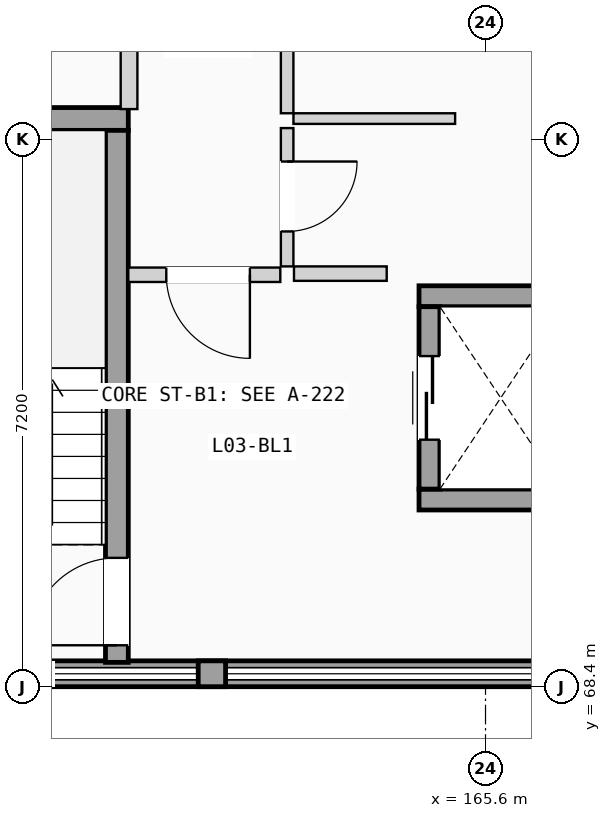
"""IFC4 building model, lengths in metres.
Left out: names, types, materials, properties, quantities, classifications, styles, units other than length and angle.
Written with IfcOpenShell. Run it as: python <this file> out.ifc"""

import sys

from ifc_helpers import new_model, si_unit, direction, frame, frame_2d, origin, place, context, subcontext, project, spatial, rectangle, extrude, element, fill, save


model = new_model("IFC4")
c1 = context("Model", 3, precision=1e-05, world=origin(), true_north=direction((0.0, 1.0)))
c2 = subcontext(c1, "Body", "Model", "MODEL_VIEW")
j1 = project(units=[si_unit("LENGTHUNIT", "METRE"), si_unit("PLANEANGLEUNIT", "RADIAN")], contexts=[c1])
p1 = place(None, origin())
s1 = spatial("IfcSite", under=j1, at=p1, CompositionType="ELEMENT")
p2 = place(p1, origin())
s2 = spatial("IfcBuilding", under=s1, at=p2, CompositionType="ELEMENT")
p3 = place(p2, frame((0.0, 0.0, 12.075)))
s3 = spatial("IfcBuildingStorey", under=s2, at=p3, CompositionType="ELEMENT", Elevation=12.075)
p4 = place(p3, frame((151.2, 68.57, 0.0), z_axis=(0.0, 0.0, 1.0), x_axis=(1.0, 0.0, 0.0)))
e1 = element("IfcWall", 1, at=p4, inside=s3, PredefinedType="SOLIDWALL", context=c2, shape_type="SweptSolid", body=[
    extrude(rectangle(XDim=21.6, YDim=0.34, at=frame_2d((10.8, 0.0))), origin(), (0.0, 0.0, 1.0), 1.11),
])
p5 = place(p3, frame((161.82, 68.57, 1.11), z_axis=(0.0, 0.0, 1.0), x_axis=(1.0, 0.0, 0.0)))
e2 = element("IfcWall", 2, at=p5, inside=s3, PredefinedType="SOLIDWALL", context=c2, shape_type="SweptSolid", body=[
    extrude(rectangle(XDim=0.36, YDim=0.34, at=frame_2d((0.18, 0.0))), origin(), (0.0, 0.0, 1.0), 1.78),
])
p6 = place(p3, frame((156.95, 75.87, 0.0), z_axis=(0.0, 0.0, 1.0), x_axis=(1.0, 0.0, 0.0)))
e3 = element("IfcWall", 3, at=p6, inside=s3, PredefinedType="SHEAR", context=c2, shape_type="SweptSolid", body=[
    extrude(rectangle(XDim=3.95, YDim=0.3, at=frame_2d((1.975, 0.0))), origin(), (0.0, 0.0, 1.0), 2.89),
])
p7 = place(p3, frame((160.75, 68.72, 0.0), z_axis=(0.0, 0.0, 1.0), x_axis=(0.0, 1.0, 0.0)))
e4 = element("IfcWall", 4, at=p7, inside=s3, PredefinedType="SHEAR", context=c2, shape_type="SweptSolid", body=[
    extrude(rectangle(XDim=7.0, YDim=0.3, at=frame_2d((3.5, 0.0))), origin(), (0.0, 0.0, 1.0), 2.89),
])
p8 = place(p7, frame((0.225, 0.0, 0.0)))
e5 = element("IfcOpeningElement", 5, at=p8, cuts=e4, PredefinedType="OPENING", context=c2, shape_type="SweptSolid", body=[
    extrude(rectangle(XDim=1.15, YDim=2.12, at=frame_2d((0.575, 1.06))), frame((0.0, 0.16, 0.0), z_axis=(0.0, -1.0, 0.0), x_axis=(1.0, 0.0, 0.0)), (0.0, 0.0, 1.0), 0.32),
])
for number, where, z_axis, x_axis in (
    (6, (164.725, 70.863, 0.0), (0.0, 0.0, 1.0), (1.0, 0.0, 0.0)),
    (7, (164.725, 73.538, 0.0), (0.0, 0.0, 1.0), (1.0, 0.0, 0.0)),
):
    element("IfcWall", number, at=place(p3, frame(where, z_axis=z_axis, x_axis=x_axis)), inside=s3, PredefinedType="SHEAR", context=c2, shape_type="SweptSolid", body=[
        extrude(rectangle(XDim=2.15, YDim=0.275, at=frame_2d((1.075, 0.0))), origin(), (0.0, 0.0, 1.0), 2.89),
    ])
p9 = place(p3, frame((164.863, 71.0, 0.0), z_axis=(0.0, 0.0, 1.0), x_axis=(0.0, 1.0, 0.0)))
e8 = element("IfcWall", 8, at=p9, inside=s3, PredefinedType="SHEAR", context=c2, shape_type="SweptSolid", body=[
    extrude(rectangle(XDim=2.4, YDim=0.275, at=frame_2d((1.2, 0.0))), origin(), (0.0, 0.0, 1.0), 2.89),
])
p10 = place(p9, frame((0.65, 0.0, 0.0)))
e9 = element("IfcOpeningElement", 9, at=p10, cuts=e8, PredefinedType="OPENING", context=c2, shape_type="SweptSolid", body=[
    extrude(rectangle(XDim=1.1, YDim=2.15, at=frame_2d((0.55, 1.075))), frame((0.0, 0.147, 0.0), z_axis=(0.0, -1.0, 0.0), x_axis=(1.0, 0.0, 0.0)), (0.0, 0.0, 1.0), 0.295),
])
p11 = place(p3, frame((163.08, 73.835, 0.0), z_axis=(0.0, 0.0, 1.0), x_axis=(1.0, 0.0, 0.0)))
e10 = element("IfcWall", 10, at=p11, inside=s3, PredefinedType="PARTITIONING", context=c2, shape_type="SweptSolid", body=[
    extrude(rectangle(XDim=1.22, YDim=0.19, at=frame_2d((0.61, 0.0))), origin(), (0.0, 0.0, 1.0), 2.87),
])
p12 = place(p3, frame((160.9, 73.82, 0.0), z_axis=(0.0, 0.0, 1.0), x_axis=(1.0, 0.0, 0.0)))
e11 = element("IfcWall", 11, at=p12, inside=s3, PredefinedType="PARTITIONING", context=c2, shape_type="SweptSolid", body=[
    extrude(rectangle(XDim=2.0, YDim=0.19, at=frame_2d((1.0, 0.0))), origin(), (0.0, 0.0, 1.0), 2.87),
])
p13 = place(p12, frame((0.5, 0.0, 0.0)))
e12 = element("IfcOpeningElement", 12, at=p13, cuts=e11, PredefinedType="OPENING", context=c2, shape_type="SweptSolid", body=[
    extrude(rectangle(XDim=1.1, YDim=2.12, at=frame_2d((0.55, 1.06))), frame((0.0, 0.105, 0.0), z_axis=(0.0, -1.0, 0.0), x_axis=(1.0, 0.0, 0.0)), (0.0, 0.0, 1.0), 0.21),
])
p14 = place(p3, frame((162.99, 73.93, 0.0), z_axis=(0.0, 0.0, 1.0), x_axis=(0.0, 1.0, 0.0)))
e13 = element("IfcWall", 13, at=p14, inside=s3, PredefinedType="PARTITIONING", context=c2, shape_type="SweptSolid", body=[
    extrude(rectangle(XDim=1.82, YDim=0.165, at=frame_2d((0.91, 0.0))), origin(), (0.0, 0.0, 1.0), 2.87),
])
p15 = place(p14, frame((0.46, 0.0, 0.0)))
e14 = element("IfcOpeningElement", 14, at=p15, cuts=e13, PredefinedType="OPENING", context=c2, shape_type="SweptSolid", body=[
    extrude(rectangle(XDim=0.92, YDim=2.04, at=frame_2d((0.46, 1.02))), frame((0.0, 0.093, 0.0), z_axis=(0.0, -1.0, 0.0), x_axis=(1.0, 0.0, 0.0)), (0.0, 0.0, 1.0), 0.185),
])
p16 = place(p3, frame((163.073, 75.875, 0.0), z_axis=(0.0, 0.0, 1.0), x_axis=(1.0, 0.0, 0.0)))
e15 = element("IfcWall", 15, at=p16, inside=s3, PredefinedType="PARTITIONING", context=c2, shape_type="SweptSolid", body=[
    extrude(rectangle(XDim=2.127, YDim=0.14, at=frame_2d((1.063, 0.0))), origin(), (0.0, 0.0, 1.0), 2.87),
])
p17 = place(p3, frame((160.91, 76.0, 0.0), z_axis=(0.0, 0.0, 1.0), x_axis=(0.0, 1.0, 0.0)))
e16 = element("IfcWall", 16, at=p17, inside=s3, PredefinedType="PLUMBINGWALL", context=c2, shape_type="SweptSolid", body=[
    extrude(rectangle(XDim=3.493, YDim=0.22, at=frame_2d((1.747, 0.0))), origin(), (0.0, 0.0, 1.0), 2.87),
])
p18 = place(p3, frame((162.99, 75.945, 0.0), z_axis=(0.0, 0.0, 1.0), x_axis=(0.0, 1.0, 0.0)))
e17 = element("IfcWall", 17, at=p18, inside=s3, PredefinedType="PARTITIONING", context=c2, shape_type="SweptSolid", body=[
    extrude(rectangle(XDim=5.728, YDim=0.165, at=frame_2d((2.864, 0.0))), origin(), (0.0, 0.0, 1.0), 2.87),
])
p19 = place(p18, frame((2.402, 0.0, 0.0)))
e18 = element("IfcOpeningElement", 18, at=p19, cuts=e17, PredefinedType="OPENING", context=c2, shape_type="SweptSolid", body=[
    extrude(rectangle(XDim=0.98, YDim=2.08, at=frame_2d((0.49, 1.04))), frame((0.0, 0.093, 0.0), z_axis=(0.0, -1.0, 0.0), x_axis=(1.0, 0.0, 0.0)), (0.0, 0.0, 1.0), 0.185),
])
p20 = place(p8, origin())
e19 = element("IfcDoor", 19, at=p20, inside=s3, OperationType="SINGLE_SWING_LEFT", PredefinedType="DOOR", context=c2, shape_type="SweptSolid", body=[
    extrude(rectangle(XDim=1.15, YDim=2.12, at=frame_2d((0.575, 1.06))), frame((0.0, 0.025, 0.0), z_axis=(0.0, -1.0, 0.0), x_axis=(1.0, 0.0, 0.0)), (0.0, 0.0, 1.0), 0.05),
])
fill(e5, e19)
p21 = place(p10, origin())
e20 = element("IfcDoor", 20, at=p21, inside=s3, OperationType="SLIDING_TO_LEFT", PredefinedType="DOOR", context=c2, shape_type="SweptSolid", body=[
    extrude(rectangle(XDim=1.1, YDim=2.15, at=frame_2d((0.55, 1.075))), frame((0.0, 0.025, 0.0), z_axis=(0.0, -1.0, 0.0), x_axis=(1.0, 0.0, 0.0)), (0.0, 0.0, 1.0), 0.05),
])
fill(e9, e20)
p22 = place(p13, frame((1.1, 0.0, 0.0), z_axis=(0.0, 0.0, 1.0), x_axis=(-1.0, 0.0, 0.0)))
e21 = element("IfcDoor", 21, at=p22, inside=s3, OperationType="SINGLE_SWING_RIGHT", PredefinedType="DOOR", context=c2, shape_type="SweptSolid", body=[
    extrude(rectangle(XDim=1.1, YDim=2.12, at=frame_2d((0.55, 1.06))), frame((0.0, 0.025, 0.0), z_axis=(0.0, -1.0, 0.0), x_axis=(1.0, 0.0, 0.0)), (0.0, 0.0, 1.0), 0.05),
])
fill(e12, e21)
p23 = place(p15, frame((0.92, 0.0, 0.0), z_axis=(0.0, 0.0, 1.0), x_axis=(-1.0, 0.0, 0.0)))
e22 = element("IfcDoor", 22, at=p23, inside=s3, OperationType="SINGLE_SWING_RIGHT", PredefinedType="DOOR", context=c2, shape_type="SweptSolid", body=[
    extrude(rectangle(XDim=0.92, YDim=2.04, at=frame_2d((0.46, 1.02))), frame((0.0, 0.025, 0.0), z_axis=(0.0, -1.0, 0.0), x_axis=(1.0, 0.0, 0.0)), (0.0, 0.0, 1.0), 0.05),
])
fill(e14, e22)
save(model, sys.argv[1])
